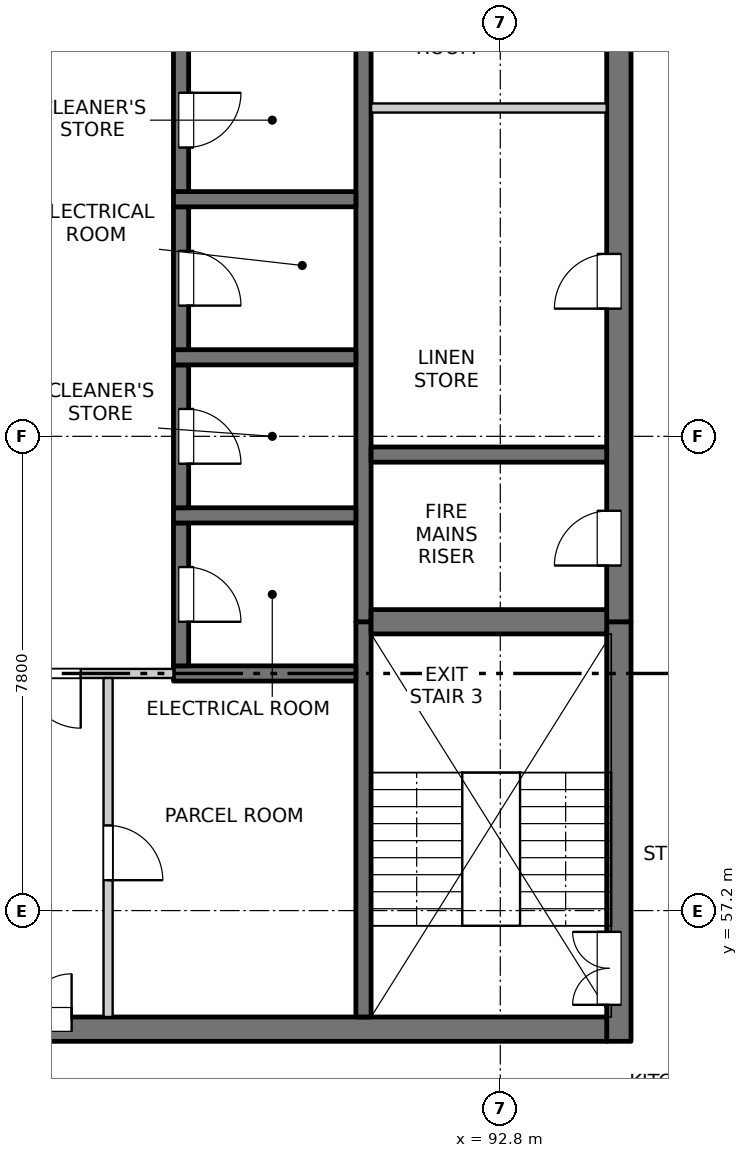
"""IFC4 building model, lengths in metres.
Left out: names, types, materials, properties, quantities, classifications, styles, units other than length and angle.
Written with IfcOpenShell. Run it as: python <this file> out.ifc"""

import sys

from ifc_helpers import new_model, si_unit, direction, frame, frame_2d, origin, place, context, subcontext, project, spatial, rectangle, extrude, element, fill, save


model = new_model("IFC4")
c1 = context("Model", 3, precision=1e-05, world=origin(), true_north=direction((0.0, 1.0)))
c2 = subcontext(c1, "Body", "Model", "MODEL_VIEW")
j1 = project(units=[si_unit("LENGTHUNIT", "METRE"), si_unit("PLANEANGLEUNIT", "RADIAN")], contexts=[c1])
p1 = place(None, origin())
s1 = spatial("IfcSite", under=j1, at=p1, CompositionType="ELEMENT")
p2 = place(p1, origin())
s2 = spatial("IfcBuilding", under=s1, at=p2, CompositionType="ELEMENT")
p3 = place(p2, frame((0.0, 0.0, 210.9)))
s3 = spatial("IfcBuildingStorey", under=s2, at=p3, CompositionType="ELEMENT", Elevation=210.9)
p4 = place(p3, frame((94.75, 55.05, -0.25), z_axis=(0.0, 0.0, 1.0), x_axis=(0.0, 1.0, 0.0)))
e1 = element("IfcWall", 1, at=p4, inside=s3, PredefinedType="SOLIDWALL", context=c2, shape_type="SweptSolid", body=[
    extrude(rectangle(XDim=6.9, YDim=0.4, at=frame_2d((3.45, 0.0))), origin(), (0.0, 0.0, 1.0), 3.4),
])
p5 = place(p4, frame((0.6, 0.0, 0.25)))
e2 = element("IfcOpeningElement", 2, at=p5, cuts=e1, PredefinedType="OPENING", context=c2, shape_type="SweptSolid", body=[
    extrude(rectangle(XDim=1.2, YDim=2.1, at=frame_2d((0.6, 1.05))), frame((0.0, 0.21, 0.0), z_axis=(0.0, -1.0, 0.0), x_axis=(1.0, 0.0, 0.0)), (0.0, 0.0, 1.0), 0.42),
])
p6 = place(p3, frame((94.75, 61.95, -0.25), z_axis=(0.0, 0.0, 1.0), x_axis=(0.0, 1.0, 0.0)))
e3 = element("IfcWall", 3, at=p6, inside=s3, PredefinedType="SOLIDWALL", context=c2, shape_type="SweptSolid", body=[
    extrude(rectangle(XDim=15.35, YDim=0.4, at=frame_2d((7.675, 0.0))), origin(), (0.0, 0.0, 1.0), 3.4),
])
p7 = place(p6, frame((0.925, 0.0, 0.25)))
e4 = element("IfcOpeningElement", 4, at=p7, cuts=e3, PredefinedType="OPENING", context=c2, shape_type="SweptSolid", body=[
    extrude(rectangle(XDim=0.9, YDim=2.1, at=frame_2d((0.45, 1.05))), frame((0.0, 0.21, 0.0), z_axis=(0.0, -1.0, 0.0), x_axis=(1.0, 0.0, 0.0)), (0.0, 0.0, 1.0), 0.42),
])
p8 = place(p6, frame((5.15, 0.0, 0.25)))
e5 = element("IfcOpeningElement", 5, at=p8, cuts=e3, PredefinedType="OPENING", context=c2, shape_type="SweptSolid", body=[
    extrude(rectangle(XDim=0.9, YDim=2.1, at=frame_2d((0.45, 1.05))), frame((0.0, 0.21, 0.0), z_axis=(0.0, -1.0, 0.0), x_axis=(1.0, 0.0, 0.0)), (0.0, 0.0, 1.0), 0.42),
])
p9 = place(p6, frame((9.65, 0.0, 0.25)))
e6 = element("IfcOpeningElement", 6, at=p9, cuts=e3, PredefinedType="OPENING", context=c2, shape_type="SweptSolid", body=[
    extrude(rectangle(XDim=0.9, YDim=2.1, at=frame_2d((0.45, 1.05))), frame((0.0, 0.21, 0.0), z_axis=(0.0, -1.0, 0.0), x_axis=(1.0, 0.0, 0.0)), (0.0, 0.0, 1.0), 0.42),
])
p10 = place(p6, frame((13.1, 0.0, 0.25)))
e7 = element("IfcOpeningElement", 7, at=p10, cuts=e3, PredefinedType="OPENING", context=c2, shape_type="SweptSolid", body=[
    extrude(rectangle(XDim=0.9, YDim=2.1, at=frame_2d((0.45, 1.05))), frame((0.0, 0.21, 0.0), z_axis=(0.0, -1.0, 0.0), x_axis=(1.0, 0.0, 0.0)), (0.0, 0.0, 1.0), 0.42),
])
p11 = place(p3, frame((75.45, 55.25, -0.25), z_axis=(0.0, 0.0, 1.0), x_axis=(1.0, 0.0, 0.0)))
e8 = element("IfcWall", 8, at=p11, inside=s3, PredefinedType="SOLIDWALL", context=c2, shape_type="SweptSolid", body=[
    extrude(rectangle(XDim=19.1, YDim=0.4, at=frame_2d((9.55, 0.0))), origin(), (0.0, 0.0, 1.0), 3.4),
])
p12 = place(p11, frame((8.8, 0.0, 0.25)))
e9 = element("IfcOpeningElement", 9, at=p12, cuts=e8, PredefinedType="OPENING", context=c2, shape_type="SweptSolid", body=[
    extrude(rectangle(XDim=1.5, YDim=2.1, at=frame_2d((0.75, 1.05))), frame((0.0, 0.21, 0.0), z_axis=(0.0, -1.0, 0.0), x_axis=(1.0, 0.0, 0.0)), (0.0, 0.0, 1.0), 0.42),
])
p13 = place(p3, frame((90.55, 55.45, -0.25), z_axis=(0.0, 0.0, 1.0), x_axis=(0.0, 1.0, 0.0)))
e10 = element("IfcWall", 10, at=p13, inside=s3, PredefinedType="SOLIDWALL", context=c2, shape_type="SweptSolid", body=[
    extrude(rectangle(XDim=6.5, YDim=0.25, at=frame_2d((3.25, 0.0))), origin(), (0.0, 0.0, 1.0), 3.4),
])
p14 = place(p3, frame((90.55, 61.95, -0.25), z_axis=(0.0, 0.0, 1.0), x_axis=(0.0, 1.0, 0.0)))
e11 = element("IfcWall", 11, at=p14, inside=s3, PredefinedType="SOLIDWALL", context=c2, shape_type="SweptSolid", body=[
    extrude(rectangle(XDim=15.35, YDim=0.25, at=frame_2d((7.675, 0.0))), origin(), (0.0, 0.0, 1.0), 3.4),
])
p15 = place(p3, frame((87.425, 61.1, -0.25), z_axis=(0.0, 0.0, 1.0), x_axis=(1.0, 0.0, 0.0)))
e12 = element("IfcWall", 12, at=p15, inside=s3, PredefinedType="SOLIDWALL", context=c2, shape_type="SweptSolid", body=[
    extrude(rectangle(XDim=3.0, YDim=0.25, at=frame_2d((1.5, 0.0))), origin(), (0.0, 0.0, 1.0), 3.4),
])
p16 = place(p3, frame((87.55, 61.225, -0.25), z_axis=(0.0, 0.0, 1.0), x_axis=(0.0, 1.0, 0.0)))
e13 = element("IfcWall", 13, at=p16, inside=s3, PredefinedType="SOLIDWALL", context=c2, shape_type="SweptSolid", body=[
    extrude(rectangle(XDim=2.35, YDim=0.25, at=frame_2d((1.175, 0.0))), origin(), (0.0, 0.0, 1.0), 3.4),
])
p17 = place(p16, frame((0.725, 0.0, 0.25)))
e14 = element("IfcOpeningElement", 14, at=p17, cuts=e13, PredefinedType="OPENING", context=c2, shape_type="SweptSolid", body=[
    extrude(rectangle(XDim=0.9, YDim=2.1, at=frame_2d((0.45, 1.05))), frame((0.0, 0.135, 0.0), z_axis=(0.0, -1.0, 0.0), x_axis=(1.0, 0.0, 0.0)), (0.0, 0.0, 1.0), 0.27),
])
p18 = place(p3, frame((87.425, 63.7, -0.25), z_axis=(0.0, 0.0, 1.0), x_axis=(1.0, 0.0, 0.0)))
e15 = element("IfcWall", 15, at=p18, inside=s3, PredefinedType="SOLIDWALL", context=c2, shape_type="SweptSolid", body=[
    extrude(rectangle(XDim=3.0, YDim=0.25, at=frame_2d((1.5, 0.0))), origin(), (0.0, 0.0, 1.0), 3.4),
])
p19 = place(p3, frame((87.55, 63.825, -0.25), z_axis=(0.0, 0.0, 1.0), x_axis=(0.0, 1.0, 0.0)))
e16 = element("IfcWall", 16, at=p19, inside=s3, PredefinedType="SOLIDWALL", context=c2, shape_type="SweptSolid", body=[
    extrude(rectangle(XDim=2.35, YDim=0.25, at=frame_2d((1.175, 0.0))), origin(), (0.0, 0.0, 1.0), 3.4),
])
p20 = place(p19, frame((0.725, 0.0, 0.25)))
e17 = element("IfcOpeningElement", 17, at=p20, cuts=e16, PredefinedType="OPENING", context=c2, shape_type="SweptSolid", body=[
    extrude(rectangle(XDim=0.9, YDim=2.1, at=frame_2d((0.45, 1.05))), frame((0.0, 0.135, 0.0), z_axis=(0.0, -1.0, 0.0), x_axis=(1.0, 0.0, 0.0)), (0.0, 0.0, 1.0), 0.27),
])
p21 = place(p3, frame((87.425, 66.3, -0.25), z_axis=(0.0, 0.0, 1.0), x_axis=(1.0, 0.0, 0.0)))
e18 = element("IfcWall", 18, at=p21, inside=s3, PredefinedType="SOLIDWALL", context=c2, shape_type="SweptSolid", body=[
    extrude(rectangle(XDim=3.0, YDim=0.25, at=frame_2d((1.5, 0.0))), origin(), (0.0, 0.0, 1.0), 3.4),
])
p22 = place(p3, frame((87.55, 66.425, -0.25), z_axis=(0.0, 0.0, 1.0), x_axis=(0.0, 1.0, 0.0)))
e19 = element("IfcWall", 19, at=p22, inside=s3, PredefinedType="SOLIDWALL", context=c2, shape_type="SweptSolid", body=[
    extrude(rectangle(XDim=2.35, YDim=0.25, at=frame_2d((1.175, 0.0))), origin(), (0.0, 0.0, 1.0), 3.4),
])
p23 = place(p22, frame((0.725, 0.0, 0.25)))
e20 = element("IfcOpeningElement", 20, at=p23, cuts=e19, PredefinedType="OPENING", context=c2, shape_type="SweptSolid", body=[
    extrude(rectangle(XDim=0.9, YDim=2.1, at=frame_2d((0.45, 1.05))), frame((0.0, 0.135, 0.0), z_axis=(0.0, -1.0, 0.0), x_axis=(1.0, 0.0, 0.0)), (0.0, 0.0, 1.0), 0.27),
])
p24 = place(p3, frame((87.425, 68.9, -0.25), z_axis=(0.0, 0.0, 1.0), x_axis=(1.0, 0.0, 0.0)))
e21 = element("IfcWall", 21, at=p24, inside=s3, PredefinedType="SOLIDWALL", context=c2, shape_type="SweptSolid", body=[
    extrude(rectangle(XDim=3.0, YDim=0.25, at=frame_2d((1.5, 0.0))), origin(), (0.0, 0.0, 1.0), 3.4),
])
p25 = place(p3, frame((87.55, 69.025, -0.25), z_axis=(0.0, 0.0, 1.0), x_axis=(0.0, 1.0, 0.0)))
e22 = element("IfcWall", 22, at=p25, inside=s3, PredefinedType="SOLIDWALL", context=c2, shape_type="SweptSolid", body=[
    extrude(rectangle(XDim=2.35, YDim=0.25, at=frame_2d((1.175, 0.0))), origin(), (0.0, 0.0, 1.0), 3.4),
])
p26 = place(p25, frame((0.725, 0.0, 0.25)))
e23 = element("IfcOpeningElement", 23, at=p26, cuts=e22, PredefinedType="OPENING", context=c2, shape_type="SweptSolid", body=[
    extrude(rectangle(XDim=0.9, YDim=2.1, at=frame_2d((0.45, 1.05))), frame((0.0, 0.135, 0.0), z_axis=(0.0, -1.0, 0.0), x_axis=(1.0, 0.0, 0.0)), (0.0, 0.0, 1.0), 0.27),
])
p27 = place(p3, frame((90.675, 61.95, -0.25), z_axis=(0.0, 0.0, 1.0), x_axis=(1.0, 0.0, 0.0)))
e24 = element("IfcWall", 24, at=p27, inside=s3, PredefinedType="SOLIDWALL", context=c2, shape_type="SweptSolid", body=[
    extrude(rectangle(XDim=3.875, YDim=0.4, at=frame_2d((1.938, 0.0))), origin(), (0.0, 0.0, 1.0), 3.4),
])
p28 = place(p3, frame((90.675, 64.7, -0.25), z_axis=(0.0, 0.0, 1.0), x_axis=(1.0, 0.0, 0.0)))
e25 = element("IfcWall", 25, at=p28, inside=s3, PredefinedType="SOLIDWALL", context=c2, shape_type="SweptSolid", body=[
    extrude(rectangle(XDim=3.875, YDim=0.25, at=frame_2d((1.938, 0.0))), origin(), (0.0, 0.0, 1.0), 3.4),
])
p29 = place(p3, frame((82.575, 61.1, 0.0), z_axis=(0.0, 0.0, 1.0), x_axis=(1.0, 0.0, 0.0)))
e26 = element("IfcWall", 26, at=p29, inside=s3, PredefinedType="PARTITIONING", context=c2, shape_type="SweptSolid", body=[
    extrude(rectangle(XDim=4.85, YDim=0.15, at=frame_2d((2.425, 0.0))), origin(), (0.0, 0.0, 1.0), 3.15),
])
p30 = place(p29, frame((1.525, 0.0, 0.0)))
e27 = element("IfcOpeningElement", 27, at=p30, cuts=e26, PredefinedType="OPENING", context=c2, shape_type="SweptSolid", body=[
    extrude(rectangle(XDim=1.8, YDim=2.1, at=frame_2d((0.9, 1.05))), frame((0.0, 0.085, 0.0), z_axis=(0.0, -1.0, 0.0), x_axis=(1.0, 0.0, 0.0)), (0.0, 0.0, 1.0), 0.17),
])
p31 = place(p3, frame((90.675, 70.4, 0.0), z_axis=(0.0, 0.0, 1.0), x_axis=(1.0, 0.0, 0.0)))
e28 = element("IfcWall", 28, at=p31, inside=s3, PredefinedType="PARTITIONING", context=c2, shape_type="SweptSolid", body=[
    extrude(rectangle(XDim=3.875, YDim=0.15, at=frame_2d((1.938, 0.0))), origin(), (0.0, 0.0, 1.0), 3.15),
])
p32 = place(p3, frame((86.35, 55.45, 0.0), z_axis=(0.0, 0.0, 1.0), x_axis=(0.0, 1.0, 0.0)))
e29 = element("IfcWall", 29, at=p32, inside=s3, PredefinedType="PARTITIONING", context=c2, shape_type="SweptSolid", body=[
    extrude(rectangle(XDim=5.575, YDim=0.15, at=frame_2d((2.788, 0.0))), origin(), (0.0, 0.0, 1.0), 3.15),
])
p33 = place(p32, frame((2.25, 0.0, 0.0)))
e30 = element("IfcOpeningElement", 30, at=p33, cuts=e29, PredefinedType="OPENING", context=c2, shape_type="SweptSolid", body=[
    extrude(rectangle(XDim=0.9, YDim=2.1, at=frame_2d((0.45, 1.05))), frame((0.0, 0.085, 0.0), z_axis=(0.0, -1.0, 0.0), x_axis=(1.0, 0.0, 0.0)), (0.0, 0.0, 1.0), 0.17),
])
p34 = place(p12, origin())
e31 = element("IfcDoor", 31, at=p34, inside=s3, OperationType="DOUBLE_DOOR_SINGLE_SWING", PredefinedType="DOOR", context=c2, shape_type="SweptSolid", body=[
    extrude(rectangle(XDim=1.5, YDim=2.1, at=frame_2d((0.75, 1.05))), frame((0.0, 0.185, 0.0), z_axis=(0.0, -1.0, 0.0), x_axis=(1.0, 0.0, 0.0)), (0.0, 0.0, 1.0), 0.05),
])
fill(e9, e31)
p35 = place(p5, origin())
e32 = element("IfcDoor", 32, at=p35, inside=s3, OperationType="DOUBLE_DOOR_SINGLE_SWING", PredefinedType="DOOR", context=c2, shape_type="SweptSolid", body=[
    extrude(rectangle(XDim=1.2, YDim=2.1, at=frame_2d((0.6, 1.05))), frame((0.0, 0.185, 0.0), z_axis=(0.0, -1.0, 0.0), x_axis=(1.0, 0.0, 0.0)), (0.0, 0.0, 1.0), 0.05),
])
fill(e2, e32)
p36 = place(p33, origin())
e33 = element("IfcDoor", 33, at=p36, inside=s3, OperationType="SINGLE_SWING_RIGHT", PredefinedType="DOOR", context=c2, shape_type="SweptSolid", body=[
    extrude(rectangle(XDim=0.9, YDim=2.1, at=frame_2d((0.45, 1.05))), frame((0.0, 0.025, 0.0), z_axis=(0.0, -1.0, 0.0), x_axis=(1.0, 0.0, 0.0)), (0.0, 0.0, 1.0), 0.05),
])
fill(e30, e33)
p37 = place(p30, origin())
e34 = element("IfcDoor", 34, at=p37, inside=s3, OperationType="DOUBLE_DOOR_SINGLE_SWING", PredefinedType="DOOR", context=c2, shape_type="SweptSolid", body=[
    extrude(rectangle(XDim=1.8, YDim=2.1, at=frame_2d((0.9, 1.05))), frame((0.0, 0.025, 0.0), z_axis=(0.0, -1.0, 0.0), x_axis=(1.0, 0.0, 0.0)), (0.0, 0.0, 1.0), 0.05),
])
fill(e27, e34)
p38 = place(p17, origin())
e35 = element("IfcDoor", 35, at=p38, inside=s3, OperationType="SINGLE_SWING_RIGHT", PredefinedType="DOOR", context=c2, shape_type="SweptSolid", body=[
    extrude(rectangle(XDim=0.9, YDim=2.1, at=frame_2d((0.45, 1.05))), frame((0.0, -0.06, 0.0), z_axis=(0.0, -1.0, 0.0), x_axis=(1.0, 0.0, 0.0)), (0.0, 0.0, 1.0), 0.05),
])
fill(e14, e35)
p39 = place(p7, origin())
e36 = element("IfcDoor", 36, at=p39, inside=s3, OperationType="SINGLE_SWING_LEFT", PredefinedType="DOOR", context=c2, shape_type="SweptSolid", body=[
    extrude(rectangle(XDim=0.9, YDim=2.1, at=frame_2d((0.45, 1.05))), frame((0.0, 0.185, 0.0), z_axis=(0.0, -1.0, 0.0), x_axis=(1.0, 0.0, 0.0)), (0.0, 0.0, 1.0), 0.05),
])
fill(e4, e36)
p40 = place(p20, origin())
e37 = element("IfcDoor", 37, at=p40, inside=s3, OperationType="SINGLE_SWING_RIGHT", PredefinedType="DOOR", context=c2, shape_type="SweptSolid", body=[
    extrude(rectangle(XDim=0.9, YDim=2.1, at=frame_2d((0.45, 1.05))), frame((0.0, -0.06, 0.0), z_axis=(0.0, -1.0, 0.0), x_axis=(1.0, 0.0, 0.0)), (0.0, 0.0, 1.0), 0.05),
])
fill(e17, e37)
p41 = place(p8, origin())
e38 = element("IfcDoor", 38, at=p41, inside=s3, OperationType="SINGLE_SWING_LEFT", PredefinedType="DOOR", context=c2, shape_type="SweptSolid", body=[
    extrude(rectangle(XDim=0.9, YDim=2.1, at=frame_2d((0.45, 1.05))), frame((0.0, 0.185, 0.0), z_axis=(0.0, -1.0, 0.0), x_axis=(1.0, 0.0, 0.0)), (0.0, 0.0, 1.0), 0.05),
])
fill(e5, e38)
p42 = place(p23, origin())
e39 = element("IfcDoor", 39, at=p42, inside=s3, OperationType="SINGLE_SWING_RIGHT", PredefinedType="DOOR", context=c2, shape_type="SweptSolid", body=[
    extrude(rectangle(XDim=0.9, YDim=2.1, at=frame_2d((0.45, 1.05))), frame((0.0, -0.06, 0.0), z_axis=(0.0, -1.0, 0.0), x_axis=(1.0, 0.0, 0.0)), (0.0, 0.0, 1.0), 0.05),
])
fill(e20, e39)
p43 = place(p26, origin())
e40 = element("IfcDoor", 40, at=p43, inside=s3, OperationType="SINGLE_SWING_LEFT", PredefinedType="DOOR", context=c2, shape_type="SweptSolid", body=[
    extrude(rectangle(XDim=0.9, YDim=2.1, at=frame_2d((0.45, 1.05))), frame((0.0, -0.06, 0.0), z_axis=(0.0, -1.0, 0.0), x_axis=(1.0, 0.0, 0.0)), (0.0, 0.0, 1.0), 0.05),
])
fill(e23, e40)
save(model, sys.argv[1])
